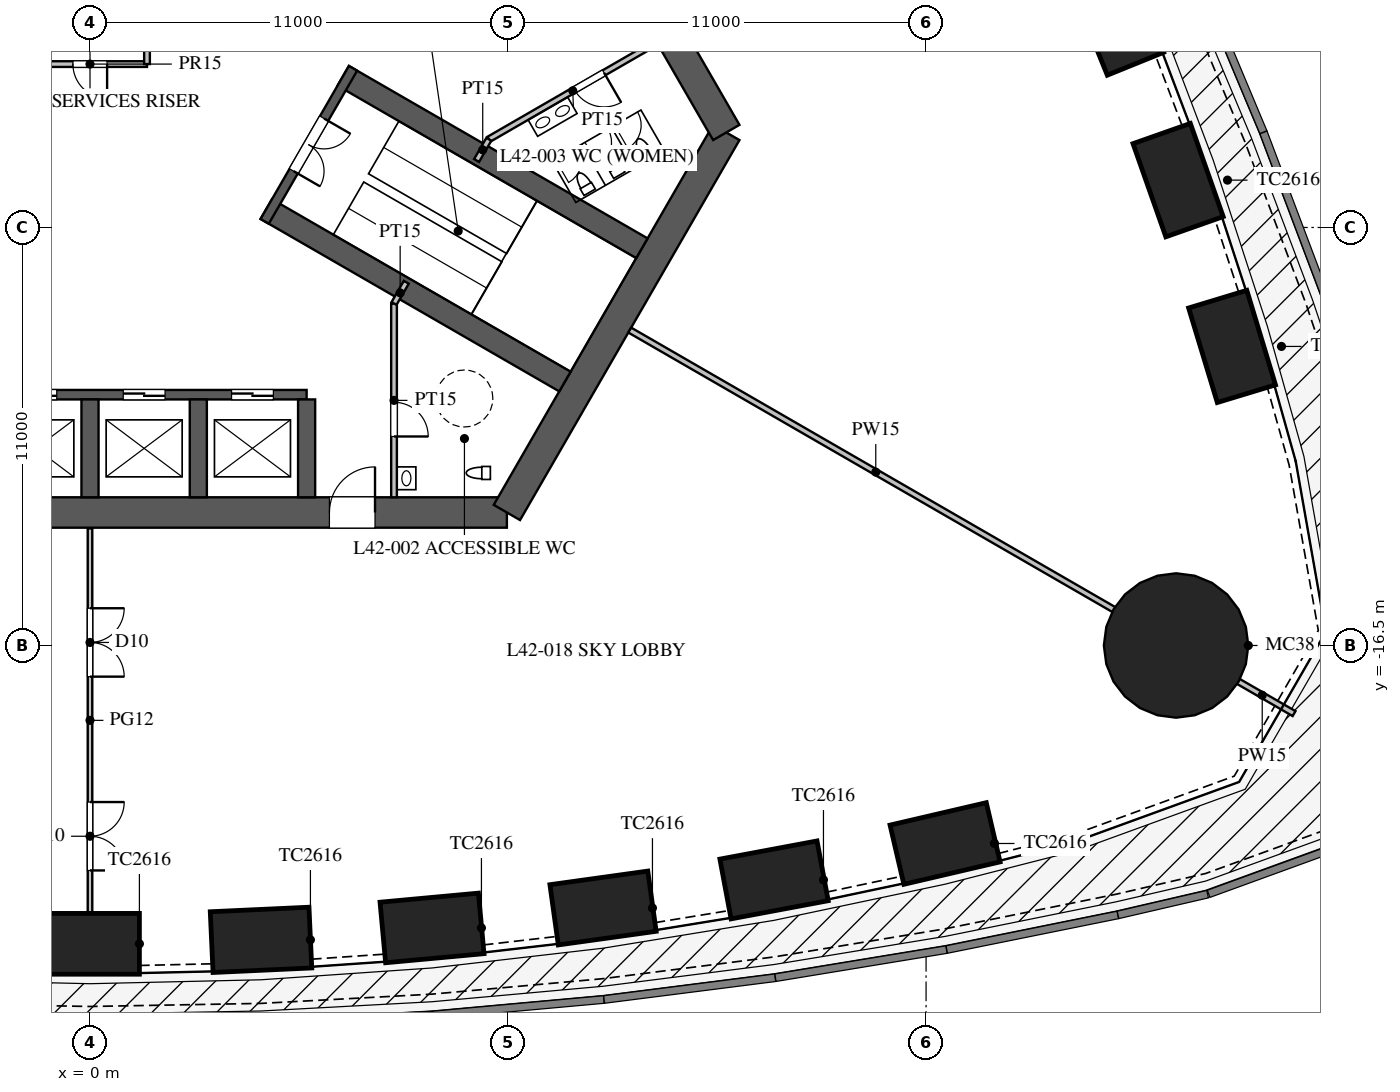
"""IFC4 building model, lengths in metres.
Left out: names, types, materials, properties, quantities, classifications, styles, units other than length and angle.
Written with IfcOpenShell. Run it as: python <this file> out.ifc"""

import sys

from ifc_helpers import new_model, si_unit, direction, frame, frame_2d, origin, origin_2d, place, context, subcontext, project, spatial, rectangle, circle, extrude, element, fill, save


model = new_model("IFC4")
c1 = context("Model", 3, precision=1e-05, world=origin(), true_north=direction((0.0, 1.0)))
c2 = subcontext(c1, "Body", "Model", "MODEL_VIEW")
j1 = project(units=[si_unit("LENGTHUNIT", "METRE"), si_unit("PLANEANGLEUNIT", "RADIAN")], contexts=[c1])
p1 = place(None, origin())
s1 = spatial("IfcSite", under=j1, at=p1, CompositionType="ELEMENT")
p2 = place(p1, origin())
s2 = spatial("IfcBuilding", under=s1, at=p2, CompositionType="ELEMENT")
p3 = place(p2, frame((0.0, 0.0, 184.7)))
s3 = spatial("IfcBuildingStorey", under=s2, at=p3, CompositionType="ELEMENT", Elevation=184.7)
for number, where, z_axis, x_axis in (
    (1, (0.0, -24.351, 0.0), (0.0, 0.0, 1.0), (1.0, 0.0, 0.0)),
    (2, (4.5, -24.246, 0.0), (0.0, 0.0, 1.0), (0.999, 0.046, 0.0)),
    (3, (9.0, -23.933, 0.0), (0.0, 0.0, 1.0), (0.996, 0.092, 0.0)),
    (4, (13.5, -23.408, 0.0), (0.0, 0.0, 1.0), (0.99, 0.138, 0.0)),
    (5, (18.0, -22.669, 0.0), (0.0, 0.0, 1.0), (0.983, 0.184, 0.0)),
    (6, (22.5, -21.71, 0.0), (0.0, 0.0, 1.0), (0.974, 0.227, 0.0)),
    (7, (30.052, -8.63, 0.0), (0.0, 0.0, 1.0), (-0.29, 0.957, 0.0)),
    (8, (28.632, -4.254, 0.0), (0.0, 0.0, 1.0), (-0.332, 0.943, 0.0)),
    (9, (27.022, 0.013, 0.0), (0.0, 0.0, 1.0), (-0.376, 0.927, 0.0)),
):
    element("IfcColumn", number, at=place(p3, frame(where, z_axis=z_axis, x_axis=x_axis)), inside=s3, PredefinedType="COLUMN", context=c2, shape_type="SweptSolid", body=[
        extrude(rectangle(XDim=2.6, YDim=1.6, at=origin_2d()), origin(), (0.0, 0.0, 1.0), 5.0),
    ])
p4 = place(p3, frame((28.579, -16.5, 0.0), z_axis=(0.0, 0.0, 1.0), x_axis=(1.0, 0.0, 0.0)))
e10 = element("IfcColumn", 10, at=p4, inside=s3, PredefinedType="COLUMN", context=c2, shape_type="SweptSolid", body=[
    extrude(circle(Radius=1.9, at=origin_2d()), origin(), (0.0, 0.0, 1.0), 5.0),
])
p5 = place(p3, frame((-10.97, -13.0, 0.0), z_axis=(0.0, 0.0, 1.0), x_axis=(1.0, 0.0, 0.0)))
e11 = element("IfcWall", 11, at=p5, inside=s3, PredefinedType="SHEAR", context=c2, shape_type="SweptSolid", body=[
    extrude(rectangle(XDim=21.939, YDim=0.8, at=frame_2d((10.97, 0.0))), origin(), (0.0, 0.0, 1.0), 5.0),
])
p6 = place(p5, frame((17.27, 0.0, 0.0)))
e12 = element("IfcOpeningElement", 12, at=p6, cuts=e11, PredefinedType="OPENING", context=c2, shape_type="SweptSolid", body=[
    extrude(rectangle(XDim=1.2, YDim=2.1, at=frame_2d((0.6, 1.05))), frame((0.0, 0.41, 0.0), z_axis=(0.0, -1.0, 0.0), x_axis=(1.0, 0.0, 0.0)), (0.0, 0.0, 1.0), 0.82),
])
p7 = place(p5, frame((3.47, 0.0, 0.0)))
e13 = element("IfcOpeningElement", 13, at=p7, cuts=e11, PredefinedType="OPENING", context=c2, shape_type="SweptSolid", body=[
    extrude(rectangle(XDim=1.2, YDim=2.1, at=frame_2d((0.6, 1.05))), frame((0.0, 0.41, 0.0), z_axis=(0.0, -1.0, 0.0), x_axis=(1.0, 0.0, 0.0)), (0.0, 0.0, 1.0), 0.82),
])
p8 = place(p3, frame((10.97, -13.0, 0.0), z_axis=(0.0, 0.0, 1.0), x_axis=(0.499995765644, 0.866027848477, 0.0)))
e14 = element("IfcWall", 14, at=p8, inside=s3, PredefinedType="SHEAR", context=c2, shape_type="SweptSolid", body=[
    extrude(rectangle(XDim=11.547, YDim=0.8, at=frame_2d((5.773, 0.0))), origin(), (0.0, 0.0, 1.0), 5.0),
])
p9 = place(p3, frame((16.743, -3.0, 0.0), z_axis=(0.0, 0.0, 1.0), x_axis=(-0.500002442456, 0.866023993627, 0.0)))
e15 = element("IfcWall", 15, at=p9, inside=s3, PredefinedType="SHEAR", context=c2, shape_type="SweptSolid", body=[
    extrude(rectangle(XDim=21.939, YDim=0.8, at=frame_2d((10.97, 0.0))), origin(), (0.0, 0.0, 1.0), 5.0),
])
p10 = place(p9, frame((17.27, 0.0, 0.0)))
e16 = element("IfcOpeningElement", 16, at=p10, cuts=e15, PredefinedType="OPENING", context=c2, shape_type="SweptSolid", body=[
    extrude(rectangle(XDim=1.2, YDim=2.1, at=frame_2d((0.6, 1.05))), frame((0.0, 0.41, 0.0), z_axis=(0.0, -1.0, 0.0), x_axis=(1.0, 0.0, 0.0)), (0.0, 0.0, 1.0), 0.82),
])
p11 = place(p9, frame((3.47, 0.0, 0.0)))
e17 = element("IfcOpeningElement", 17, at=p11, cuts=e15, PredefinedType="OPENING", context=c2, shape_type="SweptSolid", body=[
    extrude(rectangle(XDim=1.2, YDim=2.1, at=frame_2d((0.6, 1.05))), frame((0.0, 0.41, 0.0), z_axis=(0.0, -1.0, 0.0), x_axis=(1.0, 0.0, 0.0)), (0.0, 0.0, 1.0), 0.82),
])
p12 = place(p3, frame((-5.7, -9.9, 0.0), z_axis=(0.0, 0.0, 1.0), x_axis=(1.0, 0.0, 0.0)))
e18 = element("IfcWall", 18, at=p12, inside=s3, PredefinedType="SHEAR", context=c2, shape_type="SweptSolid", body=[
    extrude(rectangle(XDim=11.4, YDim=0.25, at=frame_2d((5.7, 0.0))), origin(), (0.0, 0.0, 1.0), 5.0),
])
p13 = place(p12, frame((0.875, 0.0, 0.0)))
e19 = element("IfcOpeningElement", 19, at=p13, cuts=e18, PredefinedType="OPENING", context=c2, shape_type="SweptSolid", body=[
    extrude(rectangle(XDim=1.1, YDim=2.2, at=frame_2d((0.55, 1.1))), frame((0.0, 0.135, 0.0), z_axis=(0.0, -1.0, 0.0), x_axis=(1.0, 0.0, 0.0)), (0.0, 0.0, 1.0), 0.27),
])
p14 = place(p12, frame((3.725, 0.0, 0.0)))
e20 = element("IfcOpeningElement", 20, at=p14, cuts=e18, PredefinedType="OPENING", context=c2, shape_type="SweptSolid", body=[
    extrude(rectangle(XDim=1.1, YDim=2.2, at=frame_2d((0.55, 1.1))), frame((0.0, 0.135, 0.0), z_axis=(0.0, -1.0, 0.0), x_axis=(1.0, 0.0, 0.0)), (0.0, 0.0, 1.0), 0.27),
])
p15 = place(p12, frame((6.575, 0.0, 0.0)))
e21 = element("IfcOpeningElement", 21, at=p15, cuts=e18, PredefinedType="OPENING", context=c2, shape_type="SweptSolid", body=[
    extrude(rectangle(XDim=1.1, YDim=2.2, at=frame_2d((0.55, 1.1))), frame((0.0, 0.135, 0.0), z_axis=(0.0, -1.0, 0.0), x_axis=(1.0, 0.0, 0.0)), (0.0, 0.0, 1.0), 0.27),
])
p16 = place(p12, frame((9.425, 0.0, 0.0)))
e22 = element("IfcOpeningElement", 22, at=p16, cuts=e18, PredefinedType="OPENING", context=c2, shape_type="SweptSolid", body=[
    extrude(rectangle(XDim=1.1, YDim=2.2, at=frame_2d((0.55, 1.1))), frame((0.0, 0.135, 0.0), z_axis=(0.0, -1.0, 0.0), x_axis=(1.0, 0.0, 0.0)), (0.0, 0.0, 1.0), 0.27),
])
for number, where, z_axis, x_axis in (
    (23, (0.0, -10.025, 0.0), (0.0, 0.0, 1.0), (0.0, -1.0, 0.0)),
    (24, (2.85, -10.025, 0.0), (0.0, 0.0, 1.0), (0.0, -1.0, 0.0)),
    (25, (5.7, -10.025, 0.0), (0.0, 0.0, 1.0), (0.0, -1.0, 0.0)),
):
    element("IfcWall", number, at=place(p3, frame(where, z_axis=z_axis, x_axis=x_axis)), inside=s3, PredefinedType="SHEAR", context=c2, shape_type="SweptSolid", body=[
        extrude(rectangle(XDim=2.575, YDim=0.45, at=frame_2d((1.288, 0.0))), origin(), (0.0, 0.0, 1.0), 5.0),
    ])
for number, where, z_axis, x_axis in (
    (26, (4.638, -5.016, 0.0), (0.0, 0.0, 1.0), (0.866, -0.5, 0.0)),
    (27, (6.663, -1.509, 0.0), (0.0, 0.0, 1.0), (0.866, -0.5, 0.0)),
):
    element("IfcWall", number, at=place(p3, frame(where, z_axis=z_axis, x_axis=x_axis)), inside=s3, PredefinedType="SHEAR", context=c2, shape_type="SweptSolid", body=[
        extrude(rectangle(XDim=9.075, YDim=0.6, at=frame_2d((4.538, 0.0))), origin(), (0.0, 0.0, 1.0), 5.0),
    ])
p17 = place(p3, frame((4.597, -5.339, 0.0), z_axis=(0.0, 0.0, 1.0), x_axis=(0.499984536904, 0.866034331223, 0.0)))
e28 = element("IfcWall", 28, at=p17, inside=s3, PredefinedType="SHEAR", context=c2, shape_type="SweptSolid", body=[
    extrude(rectangle(XDim=4.65, YDim=0.25, at=frame_2d((2.325, 0.0))), origin(), (0.0, 0.0, 1.0), 5.0),
])
p18 = place(p17, frame((1.525, 0.0, 0.0)))
e29 = element("IfcOpeningElement", 29, at=p18, cuts=e28, PredefinedType="OPENING", context=c2, shape_type="SweptSolid", body=[
    extrude(rectangle(XDim=1.6, YDim=2.1, at=frame_2d((0.8, 1.05))), frame((0.0, 0.135, 0.0), z_axis=(0.0, -1.0, 0.0), x_axis=(1.0, 0.0, 0.0)), (0.0, 0.0, 1.0), 0.27),
])
for number, where, z_axis, x_axis in (
    (30, (-4.5, -26.244, 0.0), (0.0, 0.0, 1.0), (1.0, -0.018, 0.0)),
    (31, (0.0, -26.325, 0.0), (0.0, 0.0, 1.0), (1.0, 0.018, 0.0)),
):
    element("IfcWall", number, at=place(p3, frame(where, z_axis=z_axis, x_axis=x_axis)), inside=s3, PredefinedType="PARAPET", context=c2, shape_type="SweptSolid", body=[
        extrude(rectangle(XDim=4.501, YDim=0.25, at=frame_2d((2.25, 0.0))), origin(), (0.0, 0.0, 1.0), 1.1),
    ])
p19 = place(p3, frame((4.5, -26.244, 0.0), z_axis=(0.0, 0.0, 1.0), x_axis=(0.998537376538, 0.054065771581, 0.0)))
e32 = element("IfcWall", 32, at=p19, inside=s3, PredefinedType="PARAPET", context=c2, shape_type="SweptSolid", body=[
    extrude(rectangle(XDim=4.507, YDim=0.25, at=frame_2d((2.253, 0.0))), origin(), (0.0, 0.0, 1.0), 1.1),
])
p20 = place(p3, frame((9.0, -26.0, 0.0), z_axis=(0.0, 0.0, 1.0), x_axis=(0.995930325215, 0.090126507295, 0.0)))
e33 = element("IfcWall", 33, at=p20, inside=s3, PredefinedType="PARAPET", context=c2, shape_type="SweptSolid", body=[
    extrude(rectangle(XDim=4.518, YDim=0.25, at=frame_2d((2.259, 0.0))), origin(), (0.0, 0.0, 1.0), 1.1),
])
p21 = place(p3, frame((13.5, -25.593, 0.0), z_axis=(0.0, 0.0, 1.0), x_axis=(0.992010652594, 0.12615413247, 0.0)))
e34 = element("IfcWall", 34, at=p21, inside=s3, PredefinedType="PARAPET", context=c2, shape_type="SweptSolid", body=[
    extrude(rectangle(XDim=4.536, YDim=0.25, at=frame_2d((2.268, 0.0))), origin(), (0.0, 0.0, 1.0), 1.1),
])
p22 = place(p3, frame((18.0, -25.021, 0.0), z_axis=(0.0, 0.0, 1.0), x_axis=(0.986764681833, 0.162158757664, 0.0)))
e35 = element("IfcWall", 35, at=p22, inside=s3, PredefinedType="PARAPET", context=c2, shape_type="SweptSolid", body=[
    extrude(rectangle(XDim=4.56, YDim=0.25, at=frame_2d((2.28, 0.0))), origin(), (0.0, 0.0, 1.0), 1.1),
])
p23 = place(p3, frame((22.5, -24.281, 0.0), z_axis=(0.0, 0.0, 1.0), x_axis=(0.980152955069, 0.198242741781, 0.0)))
e36 = element("IfcWall", 36, at=p23, inside=s3, PredefinedType="PARAPET", context=c2, shape_type="SweptSolid", body=[
    extrude(rectangle(XDim=4.591, YDim=0.25, at=frame_2d((2.295, 0.0))), origin(), (0.0, 0.0, 1.0), 1.1),
])
p24 = place(p3, frame((27.0, -23.371, 0.0), z_axis=(0.0, 0.0, 1.0), x_axis=(0.974203832844, 0.225669874089, 0.0)))
e37 = element("IfcWall", 37, at=p24, inside=s3, PredefinedType="PARAPET", context=c2, shape_type="SweptSolid", body=[
    extrude(rectangle(XDim=2.42, YDim=0.25, at=frame_2d((1.21, 0.0))), origin(), (0.0, 0.0, 1.0), 1.1),
])
p25 = place(p3, frame((29.358, -22.825, 0.0), z_axis=(0.0, 0.0, 1.0), x_axis=(0.939690503952, 0.342025959222, 0.0)))
e38 = element("IfcWall", 38, at=p25, inside=s3, PredefinedType="PARAPET", context=c2, shape_type="SweptSolid", body=[
    extrude(rectangle(XDim=4.019, YDim=0.25, at=frame_2d((2.009, 0.0))), origin(), (0.0, 0.0, 1.0), 1.1),
])
p26 = place(p3, frame((33.74, -11.697, 0.0), z_axis=(0.0, 0.0, 1.0), x_axis=(-0.318428474099, 0.947946890328, 0.0)))
e39 = element("IfcWall", 39, at=p26, inside=s3, PredefinedType="PARAPET", context=c2, shape_type="SweptSolid", body=[
    extrude(rectangle(XDim=4.591, YDim=0.25, at=frame_2d((2.295, 0.0))), origin(), (0.0, 0.0, 1.0), 1.1),
])
p27 = place(p3, frame((32.278, -7.345, 0.0), z_axis=(0.0, 0.0, 1.0), x_axis=(-0.352894560512, 0.93566309597, 0.0)))
e40 = element("IfcWall", 40, at=p27, inside=s3, PredefinedType="PARAPET", context=c2, shape_type="SweptSolid", body=[
    extrude(rectangle(XDim=4.561, YDim=0.25, at=frame_2d((2.28, 0.0))), origin(), (0.0, 0.0, 1.0), 1.1),
])
p28 = place(p3, frame((30.668, -3.078, 0.0), z_axis=(0.0, 0.0, 1.0), x_axis=(-0.386762112496, 0.922179520667, 0.0)))
e41 = element("IfcWall", 41, at=p28, inside=s3, PredefinedType="PARAPET", context=c2, shape_type="SweptSolid", body=[
    extrude(rectangle(XDim=4.536, YDim=0.25, at=frame_2d((2.268, 0.0))), origin(), (0.0, 0.0, 1.0), 1.1),
])
p29 = place(p3, frame((8.0, -7.5, 0.0), z_axis=(0.0, 0.0, 1.0), x_axis=(0.0, -1.0, 0.0)))
e42 = element("IfcWall", 42, at=p29, inside=s3, PredefinedType="PARTITIONING", context=c2, shape_type="SweptSolid", body=[
    extrude(rectangle(XDim=5.1, YDim=0.15, at=frame_2d((2.55, 0.0))), origin(), (0.0, 0.0, 1.0), 4.8),
])
p30 = place(p29, frame((2.6, 0.0, 0.0)))
e43 = element("IfcOpeningElement", 43, at=p30, cuts=e42, PredefinedType="OPENING", context=c2, shape_type="SweptSolid", body=[
    extrude(rectangle(XDim=0.9, YDim=2.1, at=frame_2d((0.45, 1.05))), frame((0.0, 0.085, 0.0), z_axis=(0.0, -1.0, 0.0), x_axis=(1.0, 0.0, 0.0)), (0.0, 0.0, 1.0), 0.17),
])
p31 = place(p3, frame((10.495, -3.178, 0.0), z_axis=(0.0, 0.0, 1.0), x_axis=(0.86602216432, 0.500005610874, 0.0)))
e44 = element("IfcWall", 44, at=p31, inside=s3, PredefinedType="PARTITIONING", context=c2, shape_type="SweptSolid", body=[
    extrude(rectangle(XDim=5.1, YDim=0.15, at=frame_2d((2.55, 0.0))), origin(), (0.0, 0.0, 1.0), 4.8),
])
p32 = place(p31, frame((2.6, 0.0, 0.0)))
e45 = element("IfcOpeningElement", 45, at=p32, cuts=e44, PredefinedType="OPENING", context=c2, shape_type="SweptSolid", body=[
    extrude(rectangle(XDim=0.9, YDim=2.1, at=frame_2d((0.45, 1.05))), frame((0.0, 0.085, 0.0), z_axis=(0.0, -1.0, 0.0), x_axis=(1.0, 0.0, 0.0)), (0.0, 0.0, 1.0), 0.17),
])
for number, where, z_axis, x_axis in (
    (46, (8.0, -7.5, 0.0), (0.0, 0.0, 1.0), (0.5, 0.866, 0.0)),
    (47, (10.495, -3.178, 0.0), (0.0, 0.0, 1.0), (-0.5, -0.866, 0.0)),
):
    element("IfcWall", number, at=place(p3, frame(where, z_axis=z_axis, x_axis=x_axis)), inside=s3, PredefinedType="PARTITIONING", context=c2, shape_type="SweptSolid", body=[
        extrude(rectangle(XDim=0.645, YDim=0.15, at=frame_2d((0.323, 0.0))), origin(), (0.0, 0.0, 1.0), 4.8),
    ])
p33 = place(p3, frame((-1.5, -1.2, 0.0), z_axis=(0.0, 0.0, 1.0), x_axis=(1.0, 0.0, 0.0)))
e48 = element("IfcWall", 48, at=p33, inside=s3, PredefinedType="PARTITIONING", context=c2, shape_type="SweptSolid", body=[
    extrude(rectangle(XDim=3.0, YDim=0.15, at=frame_2d((1.5, 0.0))), origin(), (0.0, 0.0, 1.0), 4.8),
])
p34 = place(p33, frame((1.05, 0.0, 0.0)))
e49 = element("IfcOpeningElement", 49, at=p34, cuts=e48, PredefinedType="OPENING", context=c2, shape_type="SweptSolid", body=[
    extrude(rectangle(XDim=0.9, YDim=2.1, at=frame_2d((0.45, 1.05))), frame((0.0, 0.085, 0.0), z_axis=(0.0, -1.0, 0.0), x_axis=(1.0, 0.0, 0.0)), (0.0, 0.0, 1.0), 0.17),
])
p35 = place(p3, frame((1.5, -1.2, 0.0), z_axis=(0.0, 0.0, 1.0), x_axis=(0.0, 1.0, 0.0)))
e50 = element("IfcWall", 50, at=p35, inside=s3, PredefinedType="PARTITIONING", context=c2, shape_type="SweptSolid", body=[
    extrude(rectangle(XDim=2.4, YDim=0.15, at=frame_2d((1.2, 0.0))), origin(), (0.0, 0.0, 1.0), 4.8),
])
p36 = place(p3, frame((14.203, -8.2, 0.0), z_axis=(0.0, 0.0, 1.0), x_axis=(0.866021600284, -0.500006587798, 0.0)))
e51 = element("IfcWall", 51, at=p36, inside=s3, PredefinedType="PARTITIONING", context=c2, shape_type="SweptSolid", body=[
    extrude(rectangle(XDim=14.95, YDim=0.15, at=frame_2d((7.475, 0.0))), origin(), (0.0, 0.0, 1.0), 3.2),
])
p37 = place(p3, frame((30.008, -17.325, 0.0), z_axis=(0.0, 0.0, 1.0), x_axis=(0.866013246922, -0.500021055713, 0.0)))
e52 = element("IfcWall", 52, at=p37, inside=s3, PredefinedType="PARTITIONING", context=c2, shape_type="SweptSolid", body=[
    extrude(rectangle(XDim=1.935, YDim=0.15, at=frame_2d((0.967, 0.0))), origin(), (0.0, 0.0, 1.0), 3.2),
])
p38 = place(p3, frame((0.0, -13.42, 0.0), z_axis=(0.0, 0.0, 1.0), x_axis=(0.0, -1.0, 0.0)))
e53 = element("IfcWall", 53, at=p38, inside=s3, PredefinedType="PARTITIONING", context=c2, shape_type="SweptSolid", body=[
    extrude(rectangle(XDim=10.101, YDim=0.12, at=frame_2d((5.05, 0.0))), origin(), (0.0, 0.0, 1.0), 3.4),
])
p39 = place(p38, frame((2.1, 0.0, 0.0)))
e54 = element("IfcOpeningElement", 54, at=p39, cuts=e53, PredefinedType="OPENING", context=c2, shape_type="SweptSolid", body=[
    extrude(rectangle(XDim=1.8, YDim=2.1, at=frame_2d((0.9, 1.05))), frame((0.0, 0.07, 0.0), z_axis=(0.0, -1.0, 0.0), x_axis=(1.0, 0.0, 0.0)), (0.0, 0.0, 1.0), 0.14),
])
p40 = place(p38, frame((7.2, 0.0, 0.0)))
e55 = element("IfcOpeningElement", 55, at=p40, cuts=e53, PredefinedType="OPENING", context=c2, shape_type="SweptSolid", body=[
    extrude(rectangle(XDim=1.8, YDim=2.1, at=frame_2d((0.9, 1.05))), frame((0.0, 0.07, 0.0), z_axis=(0.0, -1.0, 0.0), x_axis=(1.0, 0.0, 0.0)), (0.0, 0.0, 1.0), 0.14),
])
p41 = place(p30, origin())
e56 = element("IfcDoor", 56, at=p41, inside=s3, OperationType="SINGLE_SWING_RIGHT", PredefinedType="DOOR", context=c2, shape_type="SweptSolid", body=[
    extrude(rectangle(XDim=0.9, YDim=2.1, at=frame_2d((0.45, 1.05))), frame((0.0, 0.025, 0.0), z_axis=(0.0, -1.0, 0.0), x_axis=(1.0, 0.0, 0.0)), (0.0, 0.0, 1.0), 0.05),
])
fill(e43, e56)
p42 = place(p32, frame((0.9, 0.0, 0.0), z_axis=(0.0, 0.0, 1.0), x_axis=(-1.0, 0.0, 0.0)))
e57 = element("IfcDoor", 57, at=p42, inside=s3, OperationType="SINGLE_SWING_LEFT", PredefinedType="DOOR", context=c2, shape_type="SweptSolid", body=[
    extrude(rectangle(XDim=0.9, YDim=2.1, at=frame_2d((0.45, 1.05))), frame((0.0, 0.025, 0.0), z_axis=(0.0, -1.0, 0.0), x_axis=(1.0, 0.0, 0.0)), (0.0, 0.0, 1.0), 0.05),
])
fill(e45, e57)
p43 = place(p34, frame((0.9, 0.0, 0.0), z_axis=(0.0, 0.0, 1.0), x_axis=(-1.0, 0.0, 0.0)))
e58 = element("IfcDoor", 58, at=p43, inside=s3, OperationType="SINGLE_SWING_LEFT", PredefinedType="DOOR", context=c2, shape_type="SweptSolid", body=[
    extrude(rectangle(XDim=0.9, YDim=2.1, at=frame_2d((0.45, 1.05))), frame((0.0, 0.025, 0.0), z_axis=(0.0, -1.0, 0.0), x_axis=(1.0, 0.0, 0.0)), (0.0, 0.0, 1.0), 0.05),
])
fill(e49, e58)
p44 = place(p18, frame((1.6, 0.0, 0.0), z_axis=(0.0, 0.0, 1.0), x_axis=(-1.0, 0.0, 0.0)))
e59 = element("IfcDoor", 59, at=p44, inside=s3, OperationType="DOUBLE_DOOR_SINGLE_SWING", PredefinedType="DOOR", context=c2, shape_type="SweptSolid", body=[
    extrude(rectangle(XDim=1.6, YDim=2.1, at=frame_2d((0.8, 1.05))), frame((0.0, 0.025, 0.0), z_axis=(0.0, -1.0, 0.0), x_axis=(1.0, 0.0, 0.0)), (0.0, 0.0, 1.0), 0.05),
])
fill(e29, e59)
p45 = place(p6, origin())
e60 = element("IfcDoor", 60, at=p45, inside=s3, OperationType="SINGLE_SWING_RIGHT", PredefinedType="DOOR", context=c2, shape_type="SweptSolid", body=[
    extrude(rectangle(XDim=1.2, YDim=2.1, at=frame_2d((0.6, 1.05))), frame((0.0, 0.025, 0.0), z_axis=(0.0, -1.0, 0.0), x_axis=(1.0, 0.0, 0.0)), (0.0, 0.0, 1.0), 0.05),
])
fill(e12, e60)
p46 = place(p39, origin())
e61 = element("IfcDoor", 61, at=p46, inside=s3, OperationType="DOUBLE_DOOR_SINGLE_SWING", PredefinedType="DOOR", context=c2, shape_type="SweptSolid", body=[
    extrude(rectangle(XDim=1.8, YDim=2.1, at=frame_2d((0.9, 1.05))), frame((0.0, 0.025, 0.0), z_axis=(0.0, -1.0, 0.0), x_axis=(1.0, 0.0, 0.0)), (0.0, 0.0, 1.0), 0.05),
])
fill(e54, e61)
p47 = place(p40, origin())
e62 = element("IfcDoor", 62, at=p47, inside=s3, OperationType="DOUBLE_DOOR_SINGLE_SWING", PredefinedType="DOOR", context=c2, shape_type="SweptSolid", body=[
    extrude(rectangle(XDim=1.8, YDim=2.1, at=frame_2d((0.9, 1.05))), frame((0.0, 0.025, 0.0), z_axis=(0.0, -1.0, 0.0), x_axis=(1.0, 0.0, 0.0)), (0.0, 0.0, 1.0), 0.05),
])
fill(e55, e62)
p48 = place(p14, origin())
e63 = element("IfcDoor", 63, at=p48, inside=s3, OperationType="DOUBLE_DOOR_SLIDING", PredefinedType="DOOR", context=c2, shape_type="SweptSolid", body=[
    extrude(rectangle(XDim=1.1, YDim=2.2, at=frame_2d((0.55, 1.1))), frame((0.0, 0.025, 0.0), z_axis=(0.0, -1.0, 0.0), x_axis=(1.0, 0.0, 0.0)), (0.0, 0.0, 1.0), 0.05),
])
fill(e20, e63)
p49 = place(p15, origin())
e64 = element("IfcDoor", 64, at=p49, inside=s3, OperationType="DOUBLE_DOOR_SLIDING", PredefinedType="DOOR", context=c2, shape_type="SweptSolid", body=[
    extrude(rectangle(XDim=1.1, YDim=2.2, at=frame_2d((0.55, 1.1))), frame((0.0, 0.025, 0.0), z_axis=(0.0, -1.0, 0.0), x_axis=(1.0, 0.0, 0.0)), (0.0, 0.0, 1.0), 0.05),
])
fill(e21, e64)
p50 = place(p16, origin())
e65 = element("IfcDoor", 65, at=p50, inside=s3, OperationType="DOUBLE_DOOR_SLIDING", PredefinedType="DOOR", context=c2, shape_type="SweptSolid", body=[
    extrude(rectangle(XDim=1.1, YDim=2.2, at=frame_2d((0.55, 1.1))), frame((0.0, 0.025, 0.0), z_axis=(0.0, -1.0, 0.0), x_axis=(1.0, 0.0, 0.0)), (0.0, 0.0, 1.0), 0.05),
])
fill(e22, e65)
save(model, sys.argv[1])
